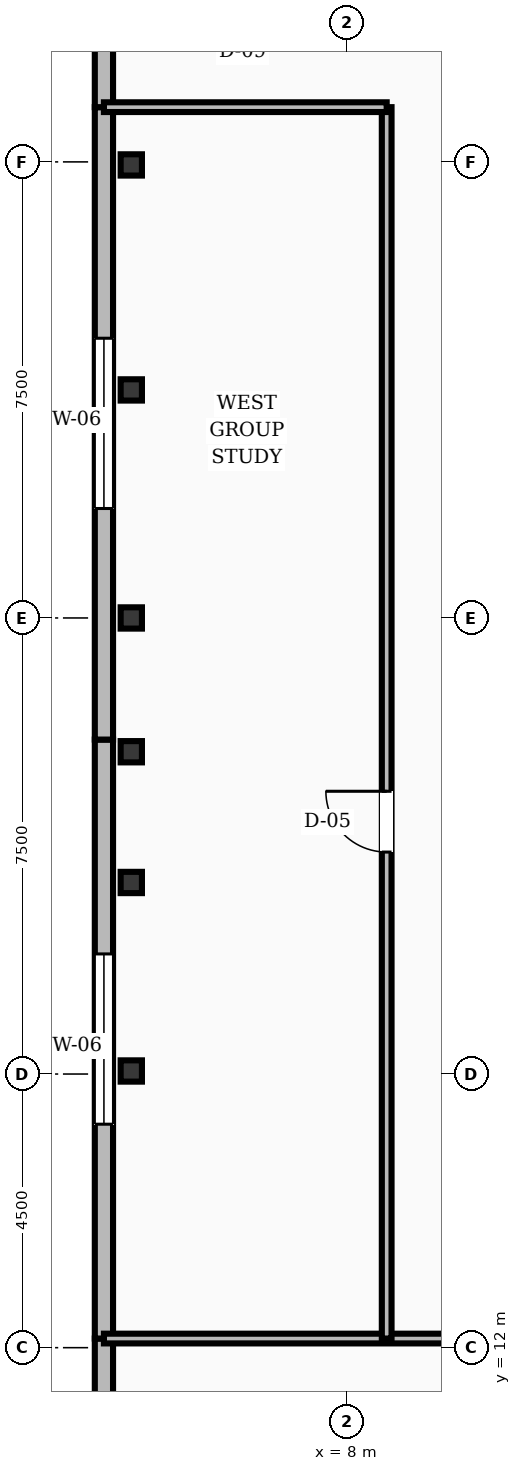
"""IFC4 building model, lengths in metres.
Left out: names, types, materials, properties, quantities, classifications, styles, units other than length and angle.
Written with IfcOpenShell. Run it as: python <this file> out.ifc"""

import sys

from ifc_helpers import new_model, si_unit, direction, frame, frame_2d, origin, origin_2d, place, context, subcontext, project, spatial, rectangle, hollow_rectangle, i_section, extrude, element, fill, save


model = new_model("IFC4")
c1 = context("Model", 3, precision=1e-05, world=origin(), true_north=direction((0.0, 1.0)))
c2 = subcontext(c1, "Body", "Model", "MODEL_VIEW")
j1 = project(units=[si_unit("LENGTHUNIT", "METRE"), si_unit("PLANEANGLEUNIT", "RADIAN")], contexts=[c1])
p1 = place(None, origin())
s1 = spatial("IfcSite", under=j1, at=p1, CompositionType="ELEMENT")
p2 = place(p1, origin())
s2 = spatial("IfcBuilding", under=s1, at=p2, CompositionType="ELEMENT")
p3 = place(p2, frame((0.0, 0.0, 19.6)))
s3 = spatial("IfcBuildingStorey", under=s2, at=p3, CompositionType="ELEMENT", Elevation=19.6)
for number, where, z_axis, x_axis in (
    (1, (4.45, 16.55, 0.0), (0.0, 0.0, 1.0), (1.0, 0.0, 0.0)),
    (2, (4.45, 19.65, 0.0), (0.0, 0.0, 1.0), (1.0, 0.0, 0.0)),
    (3, (4.45, 24.0, 0.0), (0.0, 0.0, 1.0), (1.0, 0.0, 0.0)),
    (4, (4.45, 27.75, 0.0), (0.0, 0.0, 1.0), (1.0, 0.0, 0.0)),
    (5, (4.45, 31.45, 0.0), (0.0, 0.0, 1.0), (1.0, 0.0, 0.0)),
):
    element("IfcColumn", number, at=place(p3, frame(where, z_axis=z_axis, x_axis=x_axis)), inside=s3, PredefinedType="COLUMN", context=c2, shape_type="SweptSolid", body=[
        extrude(i_section(OverallWidth=0.35, OverallDepth=0.35, WebThickness=0.012, FlangeThickness=0.019, FilletRadius=0.016, at=origin_2d()), origin(), (0.0, 0.0, 1.0), 4.8),
    ])
p4 = place(p3, frame((4.45, 21.8, 0.0), z_axis=(0.0, 0.0, 1.0), x_axis=(1.0, 0.0, 0.0)))
e6 = element("IfcColumn", 6, at=p4, inside=s3, PredefinedType="PILASTER", context=c2, shape_type="SweptSolid", body=[
    extrude(hollow_rectangle(XDim=0.35, YDim=0.35, WallThickness=0.016, at=origin_2d()), origin(), (0.0, 0.0, 1.0), 4.8),
])
p5 = place(p3, frame((4.0, 12.15, 0.0), z_axis=(0.0, 0.0, 1.0), x_axis=(0.0, -1.0, 0.0)))
e7 = element("IfcWall", 7, at=p5, inside=s3, PredefinedType="STANDARD", context=c2, shape_type="SweptSolid", body=[
    extrude(rectangle(XDim=9.15, YDim=0.3, at=frame_2d((4.575, 0.0))), origin(), (0.0, 0.0, 1.0), 3.47),
])
p6 = place(p5, frame((3.175, 0.0, 0.85)))
e8 = element("IfcOpeningElement", 8, at=p6, cuts=e7, PredefinedType="OPENING", context=c2, shape_type="SweptSolid", body=[
    extrude(rectangle(XDim=2.8, YDim=2.3, at=frame_2d((1.4, 1.15))), frame((0.0, 0.16, 0.0), z_axis=(0.0, -1.0, 0.0), x_axis=(1.0, 0.0, 0.0)), (0.0, 0.0, 1.0), 0.32),
])
p7 = place(p3, frame((4.0, 22.0, 0.0), z_axis=(0.0, 0.0, 1.0), x_axis=(0.0, -1.0, 0.0)))
e9 = element("IfcWall", 9, at=p7, inside=s3, PredefinedType="STANDARD", context=c2, shape_type="SweptSolid", body=[
    extrude(rectangle(XDim=9.85, YDim=0.3, at=frame_2d((4.925, 0.0))), origin(), (0.0, 0.0, 1.0), 3.47),
])
p8 = place(p7, frame((3.525, 0.0, 0.85)))
e10 = element("IfcOpeningElement", 10, at=p8, cuts=e9, PredefinedType="OPENING", context=c2, shape_type="SweptSolid", body=[
    extrude(rectangle(XDim=2.8, YDim=2.3, at=frame_2d((1.4, 1.15))), frame((0.0, 0.16, 0.0), z_axis=(0.0, -1.0, 0.0), x_axis=(1.0, 0.0, 0.0)), (0.0, 0.0, 1.0), 0.32),
])
p9 = place(p3, frame((4.0, 32.4, 0.0), z_axis=(0.0, 0.0, 1.0), x_axis=(0.0, -1.0, 0.0)))
e11 = element("IfcWall", 11, at=p9, inside=s3, PredefinedType="STANDARD", context=c2, shape_type="SweptSolid", body=[
    extrude(rectangle(XDim=10.4, YDim=0.3, at=frame_2d((5.2, 0.0))), origin(), (0.0, 0.0, 1.0), 3.47),
])
p10 = place(p9, frame((3.8, 0.0, 0.85)))
e12 = element("IfcOpeningElement", 12, at=p10, cuts=e11, PredefinedType="OPENING", context=c2, shape_type="SweptSolid", body=[
    extrude(rectangle(XDim=2.8, YDim=2.3, at=frame_2d((1.4, 1.15))), frame((0.0, 0.16, 0.0), z_axis=(0.0, -1.0, 0.0), x_axis=(1.0, 0.0, 0.0)), (0.0, 0.0, 1.0), 0.32),
])
p11 = place(p3, frame((4.0, 34.28, 0.0), z_axis=(0.0, 0.0, 1.0), x_axis=(0.0, -1.0, 0.0)))
e13 = element("IfcWall", 13, at=p11, inside=s3, PredefinedType="STANDARD", context=c2, shape_type="SweptSolid", body=[
    extrude(rectangle(XDim=1.88, YDim=0.3, at=frame_2d((0.94, 0.0))), origin(), (0.0, 0.0, 1.0), 3.47),
])
p12 = place(p3, frame((4.0, 12.15, 0.0), z_axis=(0.0, 0.0, 1.0), x_axis=(1.0, 0.0, 0.0)))
e14 = element("IfcWall", 14, at=p12, inside=s3, PredefinedType="SOLIDWALL", context=c2, shape_type="SweptSolid", body=[
    extrude(rectangle(XDim=51.35, YDim=0.16, at=frame_2d((25.675, 0.0))), origin(), (0.0, 0.0, 1.0), 3.42),
])
p13 = place(p12, frame((12.0, 0.0, 0.0)))
e15 = element("IfcOpeningElement", 15, at=p13, cuts=e14, PredefinedType="OPENING", context=c2, shape_type="SweptSolid", body=[
    extrude(rectangle(XDim=1.4, YDim=2.15, at=frame_2d((0.7, 1.075))), frame((0.0, 0.09, 0.0), z_axis=(0.0, -1.0, 0.0), x_axis=(1.0, 0.0, 0.0)), (0.0, 0.0, 1.0), 0.18),
])
p14 = place(p12, frame((38.0, 0.0, 0.0)))
e16 = element("IfcOpeningElement", 16, at=p14, cuts=e14, PredefinedType="OPENING", context=c2, shape_type="SweptSolid", body=[
    extrude(rectangle(XDim=1.2, YDim=2.1, at=frame_2d((0.6, 1.05))), frame((0.0, 0.09, 0.0), z_axis=(0.0, -1.0, 0.0), x_axis=(1.0, 0.0, 0.0)), (0.0, 0.0, 1.0), 0.18),
])
p15 = place(p3, frame((8.65, 12.15, 0.0), z_axis=(0.0, 0.0, 1.0), x_axis=(0.0, 1.0, 0.0)))
e17 = element("IfcWall", 17, at=p15, inside=s3, PredefinedType="SOLIDWALL", context=c2, shape_type="SweptSolid", body=[
    extrude(rectangle(XDim=20.25, YDim=0.16, at=frame_2d((10.125, 0.0))), origin(), (0.0, 0.0, 1.0), 3.42),
])
p16 = place(p15, frame((8.0, 0.0, 0.0)))
e18 = element("IfcOpeningElement", 18, at=p16, cuts=e17, PredefinedType="OPENING", context=c2, shape_type="SweptSolid", body=[
    extrude(rectangle(XDim=1.0, YDim=2.1, at=frame_2d((0.5, 1.05))), frame((0.0, 0.09, 0.0), z_axis=(0.0, -1.0, 0.0), x_axis=(1.0, 0.0, 0.0)), (0.0, 0.0, 1.0), 0.18),
])
p17 = place(p3, frame((4.0, 32.4, 0.0), z_axis=(0.0, 0.0, 1.0), x_axis=(1.0, 0.0, 0.0)))
e19 = element("IfcWall", 19, at=p17, inside=s3, PredefinedType="SOLIDWALL", context=c2, shape_type="SweptSolid", body=[
    extrude(rectangle(XDim=4.65, YDim=0.16, at=frame_2d((2.325, 0.0))), origin(), (0.0, 0.0, 1.0), 3.42),
])
p18 = place(p8, origin())
e20 = element("IfcWindow", 20, at=p18, inside=s3, PartitioningType="SINGLE_PANEL", PredefinedType="WINDOW", context=c2, shape_type="SweptSolid", body=[
    extrude(rectangle(XDim=2.8, YDim=2.3, at=frame_2d((1.4, 1.15))), frame((0.0, 0.03, 0.0), z_axis=(0.0, -1.0, 0.0), x_axis=(1.0, 0.0, 0.0)), (0.0, 0.0, 1.0), 0.06),
])
fill(e10, e20)
p19 = place(p10, origin())
e21 = element("IfcWindow", 21, at=p19, inside=s3, PartitioningType="SINGLE_PANEL", PredefinedType="WINDOW", context=c2, shape_type="SweptSolid", body=[
    extrude(rectangle(XDim=2.8, YDim=2.3, at=frame_2d((1.4, 1.15))), frame((0.0, 0.03, 0.0), z_axis=(0.0, -1.0, 0.0), x_axis=(1.0, 0.0, 0.0)), (0.0, 0.0, 1.0), 0.06),
])
fill(e12, e21)
p20 = place(p16, origin())
e22 = element("IfcDoor", 22, at=p20, inside=s3, OperationType="SINGLE_SWING_RIGHT", PredefinedType="DOOR", context=c2, shape_type="SweptSolid", body=[
    extrude(rectangle(XDim=1.0, YDim=2.1, at=frame_2d((0.5, 1.05))), frame((0.0, 0.025, 0.0), z_axis=(0.0, -1.0, 0.0), x_axis=(1.0, 0.0, 0.0)), (0.0, 0.0, 1.0), 0.05),
])
fill(e18, e22)
save(model, sys.argv[1])
